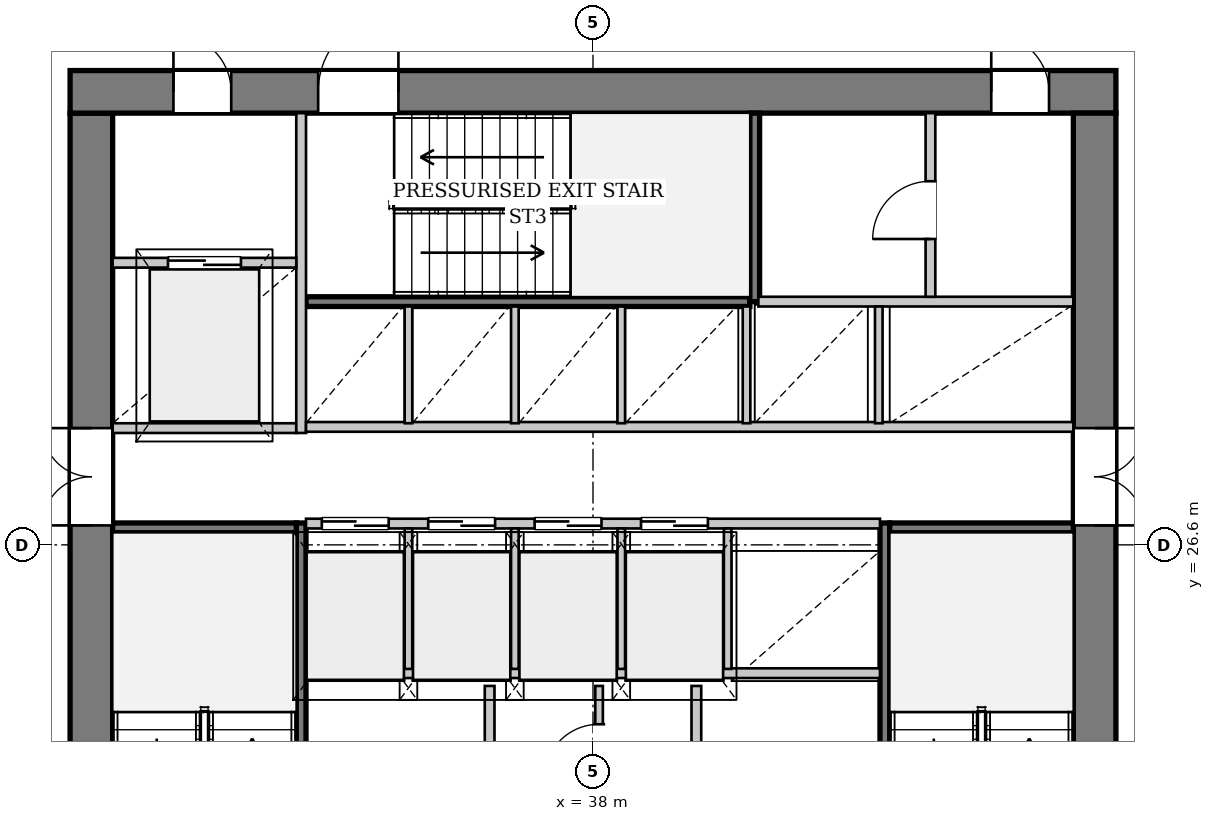
"""IFC4 building model, lengths in metres.
Left out: names, types, materials, properties, quantities, classifications, styles, units other than length and angle.
Written with IfcOpenShell. Run it as: python <this file> out.ifc"""

import sys

from ifc_helpers import new_model, si_unit, direction, frame, frame_2d, origin, place, context, subcontext, project, spatial, rectangle, extrude, source, transform, mapped, element, fill, save


model = new_model("IFC4")
c1 = context("Model", 3, precision=1e-05, world=origin(), true_north=direction((0.0, 1.0)))
c2 = subcontext(c1, "Body", "Model", "MODEL_VIEW")
j1 = project(units=[si_unit("LENGTHUNIT", "METRE"), si_unit("PLANEANGLEUNIT", "RADIAN")], contexts=[c1])
p1 = place(None, origin())
s1 = spatial("IfcSite", under=j1, at=p1, CompositionType="ELEMENT")
p2 = place(p1, origin())
s2 = spatial("IfcBuilding", under=s1, at=p2, CompositionType="ELEMENT")
p3 = place(p2, frame((0.0, 0.0, 84.4)))
s3 = spatial("IfcBuildingStorey", under=s2, at=p3, CompositionType="ELEMENT", Elevation=84.4)
p4 = place(p3, frame((29.75, 19.5, 0.0), z_axis=(0.0, 0.0, 1.0), x_axis=(0.0, 1.0, 0.0)))
e1 = element("IfcWall", 1, at=p4, inside=s3, PredefinedType="SHEAR", context=c2, shape_type="SweptSolid", body=[
    extrude(rectangle(XDim=14.2, YDim=0.7, at=frame_2d((7.1, 0.0))), origin(), (0.0, 0.0, 1.0), 3.3),
])
p5 = place(p4, frame((7.42, 0.0, 0.0)))
e2 = element("IfcOpeningElement", 2, at=p5, cuts=e1, PredefinedType="OPENING", context=c2, shape_type="SweptSolid", body=[
    extrude(rectangle(XDim=1.6, YDim=2.2, at=frame_2d((0.8, 1.1))), frame((0.0, 0.36, 0.0), z_axis=(0.0, -1.0, 0.0), x_axis=(1.0, 0.0, 0.0)), (0.0, 0.0, 1.0), 0.72),
])
p6 = place(p3, frame((29.4, 34.05, 0.0), z_axis=(0.0, 0.0, 1.0), x_axis=(1.0, 0.0, 0.0)))
e3 = element("IfcWall", 3, at=p6, inside=s3, PredefinedType="SHEAR", context=c2, shape_type="SweptSolid", body=[
    extrude(rectangle(XDim=17.2, YDim=0.7, at=frame_2d((8.6, 0.0))), origin(), (0.0, 0.0, 1.0), 3.3),
])
p7 = place(p6, frame((1.7, 0.0, 0.0)))
e4 = element("IfcOpeningElement", 4, at=p7, cuts=e3, PredefinedType="OPENING", context=c2, shape_type="SweptSolid", body=[
    extrude(rectangle(XDim=0.95, YDim=2.1, at=frame_2d((0.475, 1.05))), frame((0.0, 0.36, 0.0), z_axis=(0.0, -1.0, 0.0), x_axis=(1.0, 0.0, 0.0)), (0.0, 0.0, 1.0), 0.72),
])
p8 = place(p6, frame((4.08, 0.0, 0.0)))
e5 = element("IfcOpeningElement", 5, at=p8, cuts=e3, PredefinedType="OPENING", context=c2, shape_type="SweptSolid", body=[
    extrude(rectangle(XDim=1.32, YDim=2.2, at=frame_2d((0.66, 1.1))), frame((0.0, 0.36, 0.0), z_axis=(0.0, -1.0, 0.0), x_axis=(1.0, 0.0, 0.0)), (0.0, 0.0, 1.0), 0.72),
])
p9 = place(p6, frame((15.15, 0.0, 0.0)))
e6 = element("IfcOpeningElement", 6, at=p9, cuts=e3, PredefinedType="OPENING", context=c2, shape_type="SweptSolid", body=[
    extrude(rectangle(XDim=0.95, YDim=2.1, at=frame_2d((0.475, 1.05))), frame((0.0, 0.36, 0.0), z_axis=(0.0, -1.0, 0.0), x_axis=(1.0, 0.0, 0.0)), (0.0, 0.0, 1.0), 0.72),
])
p10 = place(p3, frame((46.25, 33.7, 0.0), z_axis=(0.0, 0.0, 1.0), x_axis=(0.0, -1.0, 0.0)))
e7 = element("IfcWall", 7, at=p10, inside=s3, PredefinedType="SHEAR", context=c2, shape_type="SweptSolid", body=[
    extrude(rectangle(XDim=14.2, YDim=0.7, at=frame_2d((7.1, 0.0))), origin(), (0.0, 0.0, 1.0), 3.3),
])
p11 = place(p10, frame((5.18, 0.0, 0.0)))
e8 = element("IfcOpeningElement", 8, at=p11, cuts=e7, PredefinedType="OPENING", context=c2, shape_type="SweptSolid", body=[
    extrude(rectangle(XDim=1.6, YDim=2.2, at=frame_2d((0.8, 1.1))), frame((0.0, 0.36, 0.0), z_axis=(0.0, -1.0, 0.0), x_axis=(1.0, 0.0, 0.0)), (0.0, 0.0, 1.0), 0.72),
])
p12 = place(p3, frame((33.2, 19.5, 0.0), z_axis=(0.0, 0.0, 1.0), x_axis=(0.0, 1.0, 0.0)))
e9 = element("IfcWall", 9, at=p12, inside=s3, PredefinedType="PARTITIONING", context=c2, shape_type="SweptSolid", body=[
    extrude(rectangle(XDim=7.46, YDim=0.16, at=frame_2d((3.73, 0.0))), origin(), (0.0, 0.0, 1.0), 3.3),
])
p13 = place(p12, frame((0.08, 0.0, 0.0)))
e10 = element("IfcOpeningElement", 10, at=p13, cuts=e9, PredefinedType="OPENING", context=c2, shape_type="SweptSolid", body=[
    extrude(rectangle(XDim=1.32, YDim=2.2, at=frame_2d((0.66, 1.1))), frame((0.0, 0.09, 0.0), z_axis=(0.0, -1.0, 0.0), x_axis=(1.0, 0.0, 0.0)), (0.0, 0.0, 1.0), 0.18),
])
p14 = place(p3, frame((30.1, 26.88, 0.0), z_axis=(0.0, 0.0, 1.0), x_axis=(1.0, 0.0, 0.0)))
e11 = element("IfcWall", 11, at=p14, inside=s3, PredefinedType="PARTITIONING", context=c2, shape_type="SweptSolid", body=[
    extrude(rectangle(XDim=3.02, YDim=0.16, at=frame_2d((1.51, 0.0))), origin(), (0.0, 0.0, 1.0), 3.3),
])
p15 = place(p3, frame((42.8, 26.96, 0.0), z_axis=(0.0, 0.0, 1.0), x_axis=(0.0, -1.0, 0.0)))
e12 = element("IfcWall", 12, at=p15, inside=s3, PredefinedType="PARTITIONING", context=c2, shape_type="SweptSolid", body=[
    extrude(rectangle(XDim=7.46, YDim=0.16, at=frame_2d((3.73, 0.0))), origin(), (0.0, 0.0, 1.0), 3.3),
])
p16 = place(p15, frame((6.06, 0.0, 0.0)))
e13 = element("IfcOpeningElement", 13, at=p16, cuts=e12, PredefinedType="OPENING", context=c2, shape_type="SweptSolid", body=[
    extrude(rectangle(XDim=1.32, YDim=2.2, at=frame_2d((0.66, 1.1))), frame((0.0, 0.09, 0.0), z_axis=(0.0, -1.0, 0.0), x_axis=(1.0, 0.0, 0.0)), (0.0, 0.0, 1.0), 0.18),
])
p17 = place(p3, frame((42.88, 26.88, 0.0), z_axis=(0.0, 0.0, 1.0), x_axis=(1.0, 0.0, 0.0)))
e14 = element("IfcWall", 14, at=p17, inside=s3, PredefinedType="PARTITIONING", context=c2, shape_type="SweptSolid", body=[
    extrude(rectangle(XDim=3.02, YDim=0.16, at=frame_2d((1.51, 0.0))), origin(), (0.0, 0.0, 1.0), 3.3),
])
p18 = place(p3, frame((33.28, 30.6, 0.0), z_axis=(0.0, 0.0, 1.0), x_axis=(1.0, 0.0, 0.0)))
e15 = element("IfcWall", 15, at=p18, inside=s3, PredefinedType="PARTITIONING", context=c2, shape_type="SweptSolid", body=[
    extrude(rectangle(XDim=7.3, YDim=0.16, at=frame_2d((3.65, 0.0))), origin(), (0.0, 0.0, 1.0), 3.3),
])
p19 = place(p3, frame((40.66, 30.6, 0.0), z_axis=(0.0, 0.0, 1.0), x_axis=(0.0, 1.0, 0.0)))
e16 = element("IfcWall", 16, at=p19, inside=s3, PredefinedType="PARTITIONING", context=c2, shape_type="SweptSolid", body=[
    extrude(rectangle(XDim=3.1, YDim=0.16, at=frame_2d((1.55, 0.0))), origin(), (0.0, 0.0, 1.0), 3.3),
])
p20 = place(p3, frame((36.3, 19.5, 0.0), z_axis=(0.0, 0.0, 1.0), x_axis=(0.0, 1.0, 0.0)))
e17 = element("IfcWall", 17, at=p20, inside=s3, PredefinedType="PARTITIONING", context=c2, shape_type="SweptSolid", body=[
    extrude(rectangle(XDim=4.78, YDim=0.16, at=frame_2d((2.39, 0.0))), origin(), (0.0, 0.0, 1.0), 3.3),
])
p21 = place(p20, frame((0.6, 0.0, 0.0)))
e18 = element("IfcOpeningElement", 18, at=p21, cuts=e17, PredefinedType="OPENING", context=c2, shape_type="SweptSolid", body=[
    extrude(rectangle(XDim=1.2, YDim=2.2, at=frame_2d((0.6, 1.1))), frame((0.0, 0.09, 0.0), z_axis=(0.0, -1.0, 0.0), x_axis=(1.0, 0.0, 0.0)), (0.0, 0.0, 1.0), 0.18),
])
p22 = place(p20, frame((2.65, 0.0, 0.0)))
e19 = element("IfcOpeningElement", 19, at=p22, cuts=e17, PredefinedType="OPENING", context=c2, shape_type="SweptSolid", body=[
    extrude(rectangle(XDim=0.95, YDim=2.1, at=frame_2d((0.475, 1.05))), frame((0.0, 0.09, 0.0), z_axis=(0.0, -1.0, 0.0), x_axis=(1.0, 0.0, 0.0)), (0.0, 0.0, 1.0), 0.18),
])
p23 = place(p3, frame((39.7, 24.28, 0.0), z_axis=(0.0, 0.0, 1.0), x_axis=(0.0, -1.0, 0.0)))
e20 = element("IfcWall", 20, at=p23, inside=s3, PredefinedType="PARTITIONING", context=c2, shape_type="SweptSolid", body=[
    extrude(rectangle(XDim=4.78, YDim=0.16, at=frame_2d((2.39, 0.0))), origin(), (0.0, 0.0, 1.0), 3.3),
])
p24 = place(p23, frame((3.12, 0.0, 0.0)))
e21 = element("IfcOpeningElement", 21, at=p24, cuts=e20, PredefinedType="OPENING", context=c2, shape_type="SweptSolid", body=[
    extrude(rectangle(XDim=1.2, YDim=2.2, at=frame_2d((0.6, 1.1))), frame((0.0, 0.09, 0.0), z_axis=(0.0, -1.0, 0.0), x_axis=(1.0, 0.0, 0.0)), (0.0, 0.0, 1.0), 0.18),
])
p25 = place(p3, frame((33.28, 24.49, 0.0), z_axis=(0.0, 0.0, 1.0), x_axis=(1.0, 0.0, 0.0)))
e22 = element("IfcWall", 22, at=p25, inside=s3, PredefinedType="PARTITIONING", context=c2, shape_type="SweptSolid", body=[
    extrude(rectangle(XDim=9.44, YDim=0.16, at=frame_2d((4.72, 0.0))), origin(), (0.0, 0.0, 1.0), 3.3),
])
p26 = place(p3, frame((38.1, 22.1, 0.0), z_axis=(0.0, 0.0, 1.0), x_axis=(0.0, 1.0, 0.0)))
e23 = element("IfcWall", 23, at=p26, inside=s3, PredefinedType="PARTITIONING", context=c2, shape_type="SweptSolid", body=[
    extrude(rectangle(XDim=2.18, YDim=0.125, at=frame_2d((1.09, 0.0))), origin(), (0.0, 0.0, 1.0), 3.3),
])
p27 = place(p26, frame((0.65, 0.0, 0.0)))
e24 = element("IfcOpeningElement", 24, at=p27, cuts=e23, PredefinedType="OPENING", context=c2, shape_type="SweptSolid", body=[
    extrude(rectangle(XDim=0.9, YDim=2.1, at=frame_2d((0.45, 1.05))), frame((0.0, 0.073, 0.0), z_axis=(0.0, -1.0, 0.0), x_axis=(1.0, 0.0, 0.0)), (0.0, 0.0, 1.0), 0.145),
])
p28 = place(p3, frame((30.1, 28.52, 0.0), z_axis=(0.0, 0.0, 1.0), x_axis=(1.0, 0.0, 0.0)))
e25 = element("IfcWall", 25, at=p28, inside=s3, PredefinedType="PARTITIONING", context=c2, shape_type="SweptSolid", body=[
    extrude(rectangle(XDim=3.02, YDim=0.16, at=frame_2d((1.51, 0.0))), origin(), (0.0, 0.0, 1.0), 3.3),
])
p29 = place(p3, frame((33.2, 28.44, 0.0), z_axis=(0.0, 0.0, 1.0), x_axis=(0.0, 1.0, 0.0)))
e26 = element("IfcWall", 26, at=p29, inside=s3, PredefinedType="PARTITIONING", context=c2, shape_type="SweptSolid", body=[
    extrude(rectangle(XDim=5.26, YDim=0.16, at=frame_2d((2.63, 0.0))), origin(), (0.0, 0.0, 1.0), 3.3),
])
p30 = place(p3, frame((30.1, 31.24, 0.0), z_axis=(0.0, 0.0, 1.0), x_axis=(1.0, 0.0, 0.0)))
e27 = element("IfcWall", 27, at=p30, inside=s3, PredefinedType="PARTITIONING", context=c2, shape_type="SweptSolid", body=[
    extrude(rectangle(XDim=3.02, YDim=0.16, at=frame_2d((1.51, 0.0))), origin(), (0.0, 0.0, 1.0), 3.3),
])
p31 = place(p30, frame((0.91, 0.0, 0.0)))
e28 = element("IfcOpeningElement", 28, at=p31, cuts=e27, PredefinedType="OPENING", context=c2, shape_type="SweptSolid", body=[
    extrude(rectangle(XDim=1.2, YDim=2.2, at=frame_2d((0.6, 1.1))), frame((0.0, 0.09, 0.0), z_axis=(0.0, -1.0, 0.0), x_axis=(1.0, 0.0, 0.0)), (0.0, 0.0, 1.0), 0.18),
])
p32 = place(p3, frame((33.28, 26.95, 0.0), z_axis=(0.0, 0.0, 1.0), x_axis=(1.0, 0.0, 0.0)))
e29 = element("IfcWall", 29, at=p32, inside=s3, PredefinedType="PARTITIONING", context=c2, shape_type="SweptSolid", body=[
    extrude(rectangle(XDim=9.44, YDim=0.16, at=frame_2d((4.72, 0.0))), origin(), (0.0, 0.0, 1.0), 3.3),
])
p33 = place(p32, frame((0.26, 0.0, 0.0)))
e30 = element("IfcOpeningElement", 30, at=p33, cuts=e29, PredefinedType="OPENING", context=c2, shape_type="SweptSolid", body=[
    extrude(rectangle(XDim=1.1, YDim=2.2, at=frame_2d((0.55, 1.1))), frame((0.0, 0.09, 0.0), z_axis=(0.0, -1.0, 0.0), x_axis=(1.0, 0.0, 0.0)), (0.0, 0.0, 1.0), 0.18),
])
p34 = place(p32, frame((2.01, 0.0, 0.0)))
e31 = element("IfcOpeningElement", 31, at=p34, cuts=e29, PredefinedType="OPENING", context=c2, shape_type="SweptSolid", body=[
    extrude(rectangle(XDim=1.1, YDim=2.2, at=frame_2d((0.55, 1.1))), frame((0.0, 0.09, 0.0), z_axis=(0.0, -1.0, 0.0), x_axis=(1.0, 0.0, 0.0)), (0.0, 0.0, 1.0), 0.18),
])
p35 = place(p32, frame((3.76, 0.0, 0.0)))
e32 = element("IfcOpeningElement", 32, at=p35, cuts=e29, PredefinedType="OPENING", context=c2, shape_type="SweptSolid", body=[
    extrude(rectangle(XDim=1.1, YDim=2.2, at=frame_2d((0.55, 1.1))), frame((0.0, 0.09, 0.0), z_axis=(0.0, -1.0, 0.0), x_axis=(1.0, 0.0, 0.0)), (0.0, 0.0, 1.0), 0.18),
])
p36 = place(p32, frame((5.51, 0.0, 0.0)))
e33 = element("IfcOpeningElement", 33, at=p36, cuts=e29, PredefinedType="OPENING", context=c2, shape_type="SweptSolid", body=[
    extrude(rectangle(XDim=1.1, YDim=2.2, at=frame_2d((0.55, 1.1))), frame((0.0, 0.09, 0.0), z_axis=(0.0, -1.0, 0.0), x_axis=(1.0, 0.0, 0.0)), (0.0, 0.0, 1.0), 0.18),
])
for number, where, z_axis, x_axis in (
    (34, (34.965, 24.56, 0.0), (0.0, 0.0, 1.0), (0.0, 1.0, 0.0)),
    (35, (36.715, 24.56, 0.0), (0.0, 0.0, 1.0), (0.0, 1.0, 0.0)),
    (36, (38.465, 24.56, 0.0), (0.0, 0.0, 1.0), (0.0, 1.0, 0.0)),
    (37, (40.215, 24.56, 0.0), (0.0, 0.0, 1.0), (0.0, 1.0, 0.0)),
):
    element("IfcWall", number, at=place(p3, frame(where, z_axis=z_axis, x_axis=x_axis)), inside=s3, PredefinedType="PARTITIONING", context=c2, shape_type="SweptSolid", body=[
        extrude(rectangle(XDim=2.31, YDim=0.125, at=frame_2d((1.155, 0.0))), origin(), (0.0, 0.0, 1.0), 3.3),
    ])
p37 = place(p3, frame((33.28, 28.54, 0.0), z_axis=(0.0, 0.0, 1.0), x_axis=(1.0, 0.0, 0.0)))
e38 = element("IfcWall", 38, at=p37, inside=s3, PredefinedType="PARTITIONING", context=c2, shape_type="SweptSolid", body=[
    extrude(rectangle(XDim=12.62, YDim=0.16, at=frame_2d((6.31, 0.0))), origin(), (0.0, 0.0, 1.0), 3.3),
])
p38 = place(p3, frame((40.72, 30.6, 0.0), z_axis=(0.0, 0.0, 1.0), x_axis=(1.0, 0.0, 0.0)))
e39 = element("IfcWall", 39, at=p38, inside=s3, PredefinedType="PARTITIONING", context=c2, shape_type="SweptSolid", body=[
    extrude(rectangle(XDim=5.18, YDim=0.16, at=frame_2d((2.59, 0.0))), origin(), (0.0, 0.0, 1.0), 3.3),
])
for number, where, z_axis, x_axis in (
    (40, (34.965, 28.6, 0.0), (0.0, 0.0, 1.0), (0.0, 1.0, 0.0)),
    (41, (36.715, 28.6, 0.0), (0.0, 0.0, 1.0), (0.0, 1.0, 0.0)),
    (42, (38.465, 28.6, 0.0), (0.0, 0.0, 1.0), (0.0, 1.0, 0.0)),
    (43, (40.525, 28.6, 0.0), (0.0, 0.0, 1.0), (0.0, 1.0, 0.0)),
    (44, (42.7, 28.6, 0.0), (0.0, 0.0, 1.0), (0.0, 1.0, 0.0)),
):
    element("IfcWall", number, at=place(p3, frame(where, z_axis=z_axis, x_axis=x_axis)), inside=s3, PredefinedType="PARTITIONING", context=c2, shape_type="SweptSolid", body=[
        extrude(rectangle(XDim=1.92, YDim=0.125, at=frame_2d((0.96, 0.0))), origin(), (0.0, 0.0, 1.0), 3.3),
    ])
p39 = place(p3, frame((43.55, 30.68, 0.0), z_axis=(0.0, 0.0, 1.0), x_axis=(0.0, 1.0, 0.0)))
e45 = element("IfcWall", 45, at=p39, inside=s3, PredefinedType="PARTITIONING", context=c2, shape_type="SweptSolid", body=[
    extrude(rectangle(XDim=3.02, YDim=0.16, at=frame_2d((1.51, 0.0))), origin(), (0.0, 0.0, 1.0), 3.3),
])
p40 = place(p39, frame((0.95, 0.0, 0.0)))
e46 = element("IfcOpeningElement", 46, at=p40, cuts=e45, PredefinedType="OPENING", context=c2, shape_type="SweptSolid", body=[
    extrude(rectangle(XDim=0.95, YDim=2.1, at=frame_2d((0.475, 1.05))), frame((0.0, 0.09, 0.0), z_axis=(0.0, -1.0, 0.0), x_axis=(1.0, 0.0, 0.0)), (0.0, 0.0, 1.0), 0.18),
])
m1 = source(origin(), c2, "Body", "SweptSolid", [
    extrude(rectangle(XDim=1.6, YDim=2.2, at=frame_2d((0.8, 1.1))), frame((0.0, 0.025, 0.0), z_axis=(0.0, -1.0, 0.0), x_axis=(1.0, 0.0, 0.0)), (0.0, 0.0, 1.0), 0.05),
])
p41 = place(p5, origin())
e47 = element("IfcDoor", 47, at=p41, inside=s3, OperationType="DOUBLE_DOOR_SINGLE_SWING", PredefinedType="DOOR", context=c2, shape_type="MappedRepresentation", body=[
    mapped(m1, transform((0.0, 0.0, 0.0), x_axis=(1.0, 0.0, 0.0), y_axis=(0.0, 1.0, 0.0), z_axis=(0.0, 0.0, 1.0), scale=1.0)),
])
fill(e2, e47)
m2 = source(origin(), c2, "Body", "SweptSolid", [
    extrude(rectangle(XDim=0.95, YDim=2.1, at=frame_2d((0.475, 1.05))), frame((0.0, 0.025, 0.0), z_axis=(0.0, -1.0, 0.0), x_axis=(1.0, 0.0, 0.0)), (0.0, 0.0, 1.0), 0.05),
])
p42 = place(p7, origin())
e48 = element("IfcDoor", 48, at=p42, inside=s3, OperationType="SINGLE_SWING_LEFT", PredefinedType="DOOR", context=c2, shape_type="MappedRepresentation", body=[
    mapped(m2, transform((0.0, 0.0, 0.0), x_axis=(1.0, 0.0, 0.0), y_axis=(0.0, 1.0, 0.0), z_axis=(0.0, 0.0, 1.0), scale=1.0)),
])
fill(e4, e48)
m3 = source(origin(), c2, "Body", "SweptSolid", [
    extrude(rectangle(XDim=1.32, YDim=2.2, at=frame_2d((0.66, 1.1))), frame((0.0, 0.025, 0.0), z_axis=(0.0, -1.0, 0.0), x_axis=(1.0, 0.0, 0.0)), (0.0, 0.0, 1.0), 0.05),
])
p43 = place(p8, origin())
e49 = element("IfcDoor", 49, at=p43, inside=s3, OperationType="SINGLE_SWING_RIGHT", PredefinedType="DOOR", context=c2, shape_type="MappedRepresentation", body=[
    mapped(m3, transform((0.0, 0.0, 0.0), x_axis=(1.0, 0.0, 0.0), y_axis=(0.0, 1.0, 0.0), z_axis=(0.0, 0.0, 1.0), scale=1.0)),
])
fill(e5, e49)
p44 = place(p11, origin())
e50 = element("IfcDoor", 50, at=p44, inside=s3, OperationType="DOUBLE_DOOR_SINGLE_SWING", PredefinedType="DOOR", context=c2, shape_type="MappedRepresentation", body=[
    mapped(m1, transform((0.0, 0.0, 0.0), x_axis=(1.0, 0.0, 0.0), y_axis=(0.0, 1.0, 0.0), z_axis=(0.0, 0.0, 1.0), scale=1.0)),
])
fill(e8, e50)
m4 = source(origin(), c2, "Body", "SweptSolid", [
    extrude(rectangle(XDim=0.9, YDim=2.1, at=frame_2d((0.45, 1.05))), frame((0.0, 0.025, 0.0), z_axis=(0.0, -1.0, 0.0), x_axis=(1.0, 0.0, 0.0)), (0.0, 0.0, 1.0), 0.05),
])
p45 = place(p27, origin())
e51 = element("IfcDoor", 51, at=p45, inside=s3, OperationType="SINGLE_SWING_LEFT", PredefinedType="DOOR", context=c2, shape_type="MappedRepresentation", body=[
    mapped(m4, transform((0.0, 0.0, 0.0), x_axis=(1.0, 0.0, 0.0), y_axis=(0.0, 1.0, 0.0), z_axis=(0.0, 0.0, 1.0), scale=1.0)),
])
fill(e24, e51)
m5 = source(origin(), c2, "Body", "SweptSolid", [
    extrude(rectangle(XDim=1.2, YDim=2.2, at=frame_2d((0.6, 1.1))), frame((0.0, 0.025, 0.0), z_axis=(0.0, -1.0, 0.0), x_axis=(1.0, 0.0, 0.0)), (0.0, 0.0, 1.0), 0.05),
])
p46 = place(p31, origin())
e52 = element("IfcDoor", 52, at=p46, inside=s3, OperationType="DOUBLE_DOOR_SLIDING", PredefinedType="DOOR", context=c2, shape_type="MappedRepresentation", body=[
    mapped(m5, transform((0.0, 0.0, 0.0), x_axis=(1.0, 0.0, 0.0), y_axis=(0.0, 1.0, 0.0), z_axis=(0.0, 0.0, 1.0), scale=1.0)),
])
fill(e28, e52)
m6 = source(origin(), c2, "Body", "SweptSolid", [
    extrude(rectangle(XDim=1.1, YDim=2.2, at=frame_2d((0.55, 1.1))), frame((0.0, 0.025, 0.0), z_axis=(0.0, -1.0, 0.0), x_axis=(1.0, 0.0, 0.0)), (0.0, 0.0, 1.0), 0.05),
])
p47 = place(p33, origin())
e53 = element("IfcDoor", 53, at=p47, inside=s3, OperationType="DOUBLE_DOOR_SLIDING", PredefinedType="DOOR", context=c2, shape_type="MappedRepresentation", body=[
    mapped(m6, transform((0.0, 0.0, 0.0), x_axis=(1.0, 0.0, 0.0), y_axis=(0.0, 1.0, 0.0), z_axis=(0.0, 0.0, 1.0), scale=1.0)),
])
fill(e30, e53)
p48 = place(p34, origin())
e54 = element("IfcDoor", 54, at=p48, inside=s3, OperationType="DOUBLE_DOOR_SLIDING", PredefinedType="DOOR", context=c2, shape_type="MappedRepresentation", body=[
    mapped(m6, transform((0.0, 0.0, 0.0), x_axis=(1.0, 0.0, 0.0), y_axis=(0.0, 1.0, 0.0), z_axis=(0.0, 0.0, 1.0), scale=1.0)),
])
fill(e31, e54)
p49 = place(p35, origin())
e55 = element("IfcDoor", 55, at=p49, inside=s3, OperationType="DOUBLE_DOOR_SLIDING", PredefinedType="DOOR", context=c2, shape_type="MappedRepresentation", body=[
    mapped(m6, transform((0.0, 0.0, 0.0), x_axis=(1.0, 0.0, 0.0), y_axis=(0.0, 1.0, 0.0), z_axis=(0.0, 0.0, 1.0), scale=1.0)),
])
fill(e32, e55)
p50 = place(p36, origin())
e56 = element("IfcDoor", 56, at=p50, inside=s3, OperationType="DOUBLE_DOOR_SLIDING", PredefinedType="DOOR", context=c2, shape_type="MappedRepresentation", body=[
    mapped(m6, transform((0.0, 0.0, 0.0), x_axis=(1.0, 0.0, 0.0), y_axis=(0.0, 1.0, 0.0), z_axis=(0.0, 0.0, 1.0), scale=1.0)),
])
fill(e33, e56)
p51 = place(p40, origin())
e57 = element("IfcDoor", 57, at=p51, inside=s3, OperationType="SINGLE_SWING_LEFT", PredefinedType="DOOR", context=c2, shape_type="MappedRepresentation", body=[
    mapped(m2, transform((0.0, 0.0, 0.0), x_axis=(1.0, 0.0, 0.0), y_axis=(0.0, 1.0, 0.0), z_axis=(0.0, 0.0, 1.0), scale=1.0)),
])
fill(e46, e57)
p52 = place(p9, origin())
e58 = element("IfcDoor", 58, at=p52, inside=s3, OperationType="SINGLE_SWING_LEFT", PredefinedType="DOOR", context=c2, shape_type="MappedRepresentation", body=[
    mapped(m2, transform((0.0, 0.0, 0.0), x_axis=(1.0, 0.0, 0.0), y_axis=(0.0, 1.0, 0.0), z_axis=(0.0, 0.0, 1.0), scale=1.0)),
])
fill(e6, e58)
save(model, sys.argv[1])
